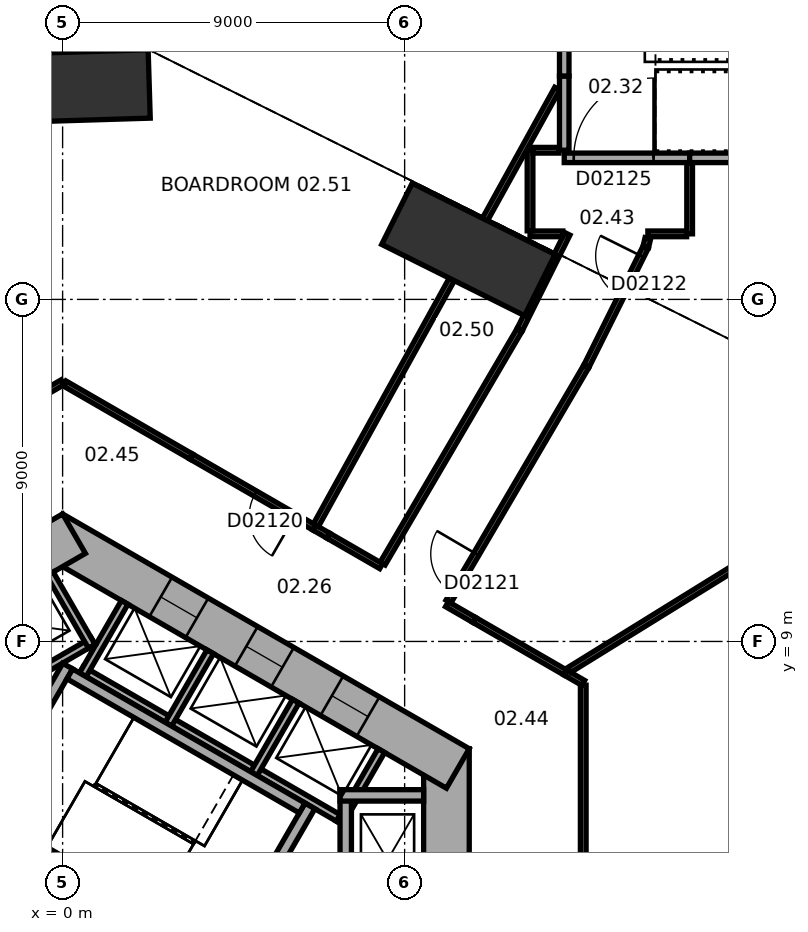
"""IFC4 building model, lengths in metres.
Left out: names, types, materials, properties, quantities, classifications, styles, units other than length and angle.
Written with IfcOpenShell. Run it as: python <this file> out.ifc"""

import sys

from ifc_helpers import new_model, si_unit, direction, frame, frame_2d, origin, origin_2d, place, context, subcontext, project, spatial, rectangle, extrude, element, fill, save


model = new_model("IFC4")
c1 = context("Model", 3, precision=1e-05, world=origin(), true_north=direction((0.0, 1.0)))
c2 = subcontext(c1, "Body", "Model", "MODEL_VIEW")
j1 = project(units=[si_unit("LENGTHUNIT", "METRE"), si_unit("PLANEANGLEUNIT", "RADIAN")], contexts=[c1])
p1 = place(None, origin())
s1 = spatial("IfcSite", under=j1, at=p1, CompositionType="ELEMENT")
p2 = place(p1, origin())
s2 = spatial("IfcBuilding", under=s1, at=p2, CompositionType="ELEMENT")
p3 = place(p2, frame((0.0, 0.0, 13.0)))
s3 = spatial("IfcBuildingStorey", under=s2, at=p3, CompositionType="ELEMENT", Elevation=13.0)
p4 = place(p3, frame((10.677, 19.315, 0.0), z_axis=(0.0, 0.0, 1.0), x_axis=(-0.894935140363, 0.446196251154, 0.0)))
e1 = element("IfcColumn", 1, at=p4, inside=s3, PredefinedType="COLUMN", context=c2, shape_type="SweptSolid", body=[
    extrude(rectangle(XDim=4.2, YDim=1.8, at=origin_2d()), origin(), (0.0, 0.0, 1.0), 8.0),
])
p5 = place(p3, frame((-0.72, 23.577, 0.0), z_axis=(0.0, 0.0, 1.0), x_axis=(-0.999533644135, -0.030536768695, 0.0)))
e2 = element("IfcColumn", 2, at=p5, inside=s3, PredefinedType="COLUMN", context=c2, shape_type="SweptSolid", body=[
    extrude(rectangle(XDim=6.0, YDim=1.8, at=origin_2d()), origin(), (0.0, 0.0, 1.0), 8.0),
])
p6 = place(p3, frame((10.1, -6.177, 0.0), z_axis=(0.0, 0.0, 1.0), x_axis=(0.0, 1.0, 0.0)))
e3 = element("IfcWall", 3, at=p6, inside=s3, PredefinedType="SHEAR", context=c2, shape_type="SweptSolid", body=[
    extrude(rectangle(XDim=12.355, YDim=1.2, at=frame_2d((6.177, 0.0))), origin(), (0.0, 0.0, 1.0), 8.0),
])
p7 = place(p6, frame((6.378, 0.0, 0.0)))
e4 = element("IfcOpeningElement", 4, at=p7, cuts=e3, PredefinedType="OPENING", context=c2, shape_type="SweptSolid", body=[
    extrude(rectangle(XDim=1.5, YDim=2.1, at=frame_2d((0.75, 1.05))), frame((0.0, 0.61, 0.0), z_axis=(0.0, -1.0, 0.0), x_axis=(1.0, 0.0, 0.0)), (0.0, 0.0, 1.0), 1.22),
])
p8 = place(p6, frame((1.828, 0.0, 0.0)))
e5 = element("IfcOpeningElement", 5, at=p8, cuts=e3, PredefinedType="OPENING", context=c2, shape_type="SweptSolid", body=[
    extrude(rectangle(XDim=1.1, YDim=2.1, at=frame_2d((0.55, 1.05))), frame((0.0, 0.61, 0.0), z_axis=(0.0, -1.0, 0.0), x_axis=(1.0, 0.0, 0.0)), (0.0, 0.0, 1.0), 1.22),
])
p9 = place(p6, frame((4.427, 0.0, 0.0)))
e6 = element("IfcOpeningElement", 6, at=p9, cuts=e3, PredefinedType="OPENING", context=c2, shape_type="SweptSolid", body=[
    extrude(rectangle(XDim=1.1, YDim=2.1, at=frame_2d((0.55, 1.05))), frame((0.0, 0.61, 0.0), z_axis=(0.0, -1.0, 0.0), x_axis=(1.0, 0.0, 0.0)), (0.0, 0.0, 1.0), 1.22),
])
p10 = place(p3, frame((10.4, 5.658, 0.0), z_axis=(0.0, 0.0, 1.0), x_axis=(-0.866021384402, 0.500006961711, 0.0)))
e7 = element("IfcWall", 7, at=p10, inside=s3, PredefinedType="SHEAR", context=c2, shape_type="SweptSolid", body=[
    extrude(rectangle(XDim=12.355, YDim=1.2, at=frame_2d((6.178, 0.0))), origin(), (0.0, 0.0, 1.0), 8.0),
])
p11 = place(p10, frame((2.728, 0.0, 0.0)))
e8 = element("IfcOpeningElement", 8, at=p11, cuts=e7, PredefinedType="OPENING", context=c2, shape_type="SweptSolid", body=[
    extrude(rectangle(XDim=1.1, YDim=2.1, at=frame_2d((0.55, 1.05))), frame((0.0, 0.61, 0.0), z_axis=(0.0, -1.0, 0.0), x_axis=(1.0, 0.0, 0.0)), (0.0, 0.0, 1.0), 1.22),
])
p12 = place(p10, frame((5.328, 0.0, 0.0)))
e9 = element("IfcOpeningElement", 9, at=p12, cuts=e7, PredefinedType="OPENING", context=c2, shape_type="SweptSolid", body=[
    extrude(rectangle(XDim=1.1, YDim=2.1, at=frame_2d((0.55, 1.05))), frame((0.0, 0.61, 0.0), z_axis=(0.0, -1.0, 0.0), x_axis=(1.0, 0.0, 0.0)), (0.0, 0.0, 1.0), 1.22),
])
p13 = place(p10, frame((7.928, 0.0, 0.0)))
e10 = element("IfcOpeningElement", 10, at=p13, cuts=e7, PredefinedType="OPENING", context=c2, shape_type="SweptSolid", body=[
    extrude(rectangle(XDim=1.1, YDim=2.1, at=frame_2d((0.55, 1.05))), frame((0.0, 0.61, 0.0), z_axis=(0.0, -1.0, 0.0), x_axis=(1.0, 0.0, 0.0)), (0.0, 0.0, 1.0), 1.22),
])
p14 = place(p3, frame((0.3, 11.836, 0.0), z_axis=(0.0, 0.0, 1.0), x_axis=(-0.866021384402, -0.500006961711, 0.0)))
e11 = element("IfcWall", 11, at=p14, inside=s3, PredefinedType="SHEAR", context=c2, shape_type="SweptSolid", body=[
    extrude(rectangle(XDim=12.355, YDim=1.2, at=frame_2d((6.178, 0.0))), origin(), (0.0, 0.0, 1.0), 8.0),
])
p15 = place(p14, frame((6.378, 0.0, 0.0)))
e12 = element("IfcOpeningElement", 12, at=p15, cuts=e11, PredefinedType="OPENING", context=c2, shape_type="SweptSolid", body=[
    extrude(rectangle(XDim=1.5, YDim=2.1, at=frame_2d((0.75, 1.05))), frame((0.0, 0.61, 0.0), z_axis=(0.0, -1.0, 0.0), x_axis=(1.0, 0.0, 0.0)), (0.0, 0.0, 1.0), 1.22),
])
p16 = place(p14, frame((1.828, 0.0, 0.0)))
e13 = element("IfcOpeningElement", 13, at=p16, cuts=e11, PredefinedType="OPENING", context=c2, shape_type="SweptSolid", body=[
    extrude(rectangle(XDim=1.1, YDim=2.1, at=frame_2d((0.55, 1.05))), frame((0.0, 0.61, 0.0), z_axis=(0.0, -1.0, 0.0), x_axis=(1.0, 0.0, 0.0)), (0.0, 0.0, 1.0), 1.22),
])
p17 = place(p3, frame((7.424, 4.259, 0.0), z_axis=(0.0, 0.0, 1.0), x_axis=(-0.866026010844, 0.49999894854, 0.0)))
e14 = element("IfcWall", 14, at=p17, inside=s3, PredefinedType="PARTITIONING", context=c2, shape_type="SweptSolid", body=[
    extrude(rectangle(XDim=8.0, YDim=0.2, at=frame_2d((4.0, 0.0))), origin(), (0.0, 0.0, 1.0), 7.7),
])
for number, where, z_axis, x_axis in (
    (15, (7.287, 4.222, 0.0), (0.0, 0.0, 1.0), (0.5, 0.866, 0.0)),
    (16, (5.036, 5.522, 0.0), (0.0, 0.0, 1.0), (0.5, 0.866, 0.0)),
    (17, (2.784, 6.822, 0.0), (0.0, 0.0, 1.0), (0.5, 0.866, 0.0)),
    (18, (0.532, 8.122, 0.0), (0.0, 0.0, 1.0), (0.5, 0.866, 0.0)),
):
    element("IfcWall", number, at=place(p3, frame(where, z_axis=z_axis, x_axis=x_axis)), inside=s3, PredefinedType="PARTITIONING", context=c2, shape_type="SweptSolid", body=[
        extrude(rectangle(XDim=2.2, YDim=0.2, at=frame_2d((1.1, 0.0))), origin(), (0.0, 0.0, 1.0), 7.7),
    ])
p18 = place(p3, frame((0.803, 9.009, 0.0), z_axis=(0.0, 0.0, 1.0), x_axis=(-0.866028230842, -0.499995103361, 0.0)))
e19 = element("IfcWall", 19, at=p18, inside=s3, PredefinedType="PARTITIONING", context=c2, shape_type="SweptSolid", body=[
    extrude(rectangle(XDim=5.4, YDim=0.2, at=frame_2d((2.7, 0.0))), origin(), (0.0, 0.0, 1.0), 7.7),
])
p19 = place(p3, frame((0.767, 8.872, 0.0), z_axis=(0.0, 0.0, 1.0), x_axis=(-0.499994660107, 0.866028486751, 0.0)))
e20 = element("IfcWall", 20, at=p19, inside=s3, PredefinedType="PARTITIONING", context=c2, shape_type="SweptSolid", body=[
    extrude(rectangle(XDim=2.2, YDim=0.2, at=frame_2d((1.1, 0.0))), origin(), (0.0, 0.0, 1.0), 7.7),
])
p20 = place(p3, frame((4.158, 0.602, 0.0), z_axis=(0.0, 0.0, 1.0), x_axis=(0.499977259774, 0.866038532462, 0.0)))
e21 = element("IfcWall", 21, at=p20, inside=s3, PredefinedType="SHEAR", context=c2, shape_type="SweptSolid", body=[
    extrude(rectangle(XDim=4.7, YDim=0.3, at=frame_2d((2.35, 0.0))), origin(), (0.0, 0.0, 1.0), 7.7),
])
p21 = place(p20, frame((0.8, 0.0, 0.0)))
e22 = element("IfcOpeningElement", 22, at=p21, cuts=e21, PredefinedType="OPENING", context=c2, shape_type="SweptSolid", body=[
    extrude(rectangle(XDim=1.2, YDim=2.1, at=frame_2d((0.6, 1.05))), frame((0.0, 0.16, 0.0), z_axis=(0.0, -1.0, 0.0), x_axis=(1.0, 0.0, 0.0)), (0.0, 0.0, 1.0), 0.32),
])
p22 = place(p3, frame((-2.216, 4.282, 0.0), z_axis=(0.0, 0.0, 1.0), x_axis=(0.499977259774, 0.866038532462, 0.0)))
e23 = element("IfcWall", 23, at=p22, inside=s3, PredefinedType="SHEAR", context=c2, shape_type="SweptSolid", body=[
    extrude(rectangle(XDim=4.7, YDim=0.3, at=frame_2d((2.35, 0.0))), origin(), (0.0, 0.0, 1.0), 7.7),
])
for number, where, z_axis, x_axis in (
    (24, (4.103, 0.807, 0.0), (0.0, 0.0, 1.0), (-0.866, 0.5, 0.0)),
    (25, (6.303, 4.617, 0.0), (0.0, 0.0, 1.0), (-0.866, 0.5, 0.0)),
):
    element("IfcWall", number, at=place(p3, frame(where, z_axis=z_axis, x_axis=x_axis)), inside=s3, PredefinedType="SHEAR", context=c2, shape_type="SweptSolid", body=[
        extrude(rectangle(XDim=7.06, YDim=0.3, at=frame_2d((3.53, 0.0))), origin(), (0.0, 0.0, 1.0), 7.7),
    ])
p23 = place(p3, frame((7.45, 1.75, 0.0), z_axis=(0.0, 0.0, 1.0), x_axis=(0.0, 1.0, 0.0)))
e26 = element("IfcWall", 26, at=p23, inside=s3, PredefinedType="SHEAR", context=c2, shape_type="SweptSolid", body=[
    extrude(rectangle(XDim=3.35, YDim=0.3, at=frame_2d((1.675, 0.0))), origin(), (0.0, 0.0, 1.0), 7.7),
])
p24 = place(p3, frame((7.3, 4.95, 0.0), z_axis=(0.0, 0.0, 1.0), x_axis=(1.0, 0.0, 0.0)))
e27 = element("IfcWall", 27, at=p24, inside=s3, PredefinedType="SHEAR", context=c2, shape_type="SweptSolid", body=[
    extrude(rectangle(XDim=2.2, YDim=0.3, at=frame_2d((1.1, 0.0))), origin(), (0.0, 0.0, 1.0), 7.7),
])
p25 = place(p3, frame((13.7, 7.85, 0.0), z_axis=(0.0, 0.0, 1.0), x_axis=(0.0, -1.0, 0.0)))
e28 = element("IfcWall", 28, at=p25, inside=s3, PredefinedType="PARTITIONING", context=c2, shape_type="SweptSolid", body=[
    extrude(rectangle(XDim=7.187, YDim=0.15, at=frame_2d((3.594, 0.0))), origin(), (0.0, 0.0, 1.0), 7.7),
])
p26 = place(p3, frame((13.7, 7.909, 0.0), z_axis=(0.0, 0.0, 1.0), x_axis=(-0.865629350875, 0.50068535719, 0.0)))
e29 = element("IfcWall", 29, at=p26, inside=s3, PredefinedType="PARTITIONING", context=c2, shape_type="SweptSolid", body=[
    extrude(rectangle(XDim=0.549, YDim=0.15, at=frame_2d((0.274, 0.0))), origin(), (0.0, 0.0, 1.0), 7.7),
])
p27 = place(p3, frame((10.833, 9.564, 0.0), z_axis=(0.0, 0.0, 1.0), x_axis=(0.866091368387, -0.499885728548, 0.0)))
e30 = element("IfcWall", 30, at=p27, inside=s3, PredefinedType="PARTITIONING", context=c2, shape_type="SweptSolid", body=[
    extrude(rectangle(XDim=2.761, YDim=0.15, at=frame_2d((1.381, 0.0))), origin(), (0.0, 0.0, 1.0), 7.7),
])
p28 = place(p3, frame((10.114, 9.98, 0.0), z_axis=(0.0, 0.0, 1.0), x_axis=(0.865848115047, -0.500306947453, 0.0)))
e31 = element("IfcWall", 31, at=p28, inside=s3, PredefinedType="PARTITIONING", context=c2, shape_type="SweptSolid", body=[
    extrude(rectangle(XDim=0.832, YDim=0.15, at=frame_2d((0.416, 0.0))), origin(), (0.0, 0.0, 1.0), 7.7),
])
p29 = place(p3, frame((8.422, 11.05, 0.0), z_axis=(0.0, 0.0, 1.0), x_axis=(0.50561651199, 0.862758333952, 0.0)))
e32 = element("IfcWall", 32, at=p29, inside=s3, PredefinedType="PARTITIONING", context=c2, shape_type="SweptSolid", body=[
    extrude(rectangle(XDim=7.118, YDim=0.15, at=frame_2d((3.559, 0.0))), origin(), (0.0, 0.0, 1.0), 6.9),
])
p30 = place(p3, frame((6.995, 11.781, 0.0), z_axis=(0.0, 0.0, 1.0), x_axis=(0.866076391369, -0.499911676512, 0.0)))
e33 = element("IfcWall", 33, at=p30, inside=s3, PredefinedType="PARTITIONING", context=c2, shape_type="SweptSolid", body=[
    extrude(rectangle(XDim=1.601, YDim=0.15, at=frame_2d((0.8, 0.0))), origin(), (0.0, 0.0, 1.0), 7.7),
])
p31 = place(p3, frame((6.995, 11.781, 0.0), z_axis=(0.0, 0.0, 1.0), x_axis=(-0.866281716711, 0.49955578997, 0.0)))
e34 = element("IfcWall", 34, at=p31, inside=s3, PredefinedType="PARTITIONING", context=c2, shape_type="SweptSolid", body=[
    extrude(rectangle(XDim=0.423, YDim=0.15, at=frame_2d((0.211, 0.0))), origin(), (0.0, 0.0, 1.0), 7.7),
])
p32 = place(p3, frame((6.629, 11.992, 0.0), z_axis=(0.0, 0.0, 1.0), x_axis=(-0.86599558016, 0.500051652475, 0.0)))
e35 = element("IfcWall", 35, at=p32, inside=s3, PredefinedType="PARTITIONING", context=c2, shape_type="SweptSolid", body=[
    extrude(rectangle(XDim=3.745, YDim=0.15, at=frame_2d((1.872, 0.0))), origin(), (0.0, 0.0, 1.0), 7.7),
])
p33 = place(p32, frame((0.6, 0.0, 0.0)))
e36 = element("IfcOpeningElement", 36, at=p33, cuts=e35, PredefinedType="OPENING", context=c2, shape_type="SweptSolid", body=[
    extrude(rectangle(XDim=1.2, YDim=2.1, at=frame_2d((0.6, 1.05))), frame((0.0, 0.085, 0.0), z_axis=(0.0, -1.0, 0.0), x_axis=(1.0, 0.0, 0.0)), (0.0, 0.0, 1.0), 0.17),
])
p34 = place(p3, frame((6.668, 12.062, 0.0), z_axis=(0.0, 0.0, 1.0), x_axis=(0.483795376692, 0.875181143245, 0.0)))
e37 = element("IfcWall", 37, at=p34, inside=s3, PredefinedType="PARTITIONING", context=c2, shape_type="SweptSolid", body=[
    extrude(rectangle(XDim=7.387, YDim=0.15, at=frame_2d((3.693, 0.0))), origin(), (0.0, 0.0, 1.0), 7.7),
])
p35 = place(p3, frame((19.949, 12.345, 0.0), z_axis=(0.0, 0.0, 1.0), x_axis=(-0.850341306025, -0.526231568102, 0.0)))
e38 = element("IfcWall", 38, at=p35, inside=s3, PredefinedType="MOVABLE", context=c2, shape_type="SweptSolid", body=[
    extrude(rectangle(XDim=7.787, YDim=0.15, at=frame_2d((3.894, 0.0))), origin(), (0.0, 0.0, 1.0), 7.7),
])
p36 = place(p3, frame((3.386, 13.865, 0.0), z_axis=(0.0, 0.0, 1.0), x_axis=(-0.866006051527, 0.500033517596, 0.0)))
e39 = element("IfcWall", 39, at=p36, inside=s3, PredefinedType="PARTITIONING", context=c2, shape_type="SweptSolid", body=[
    extrude(rectangle(XDim=3.85, YDim=0.15, at=frame_2d((1.925, 0.0))), origin(), (0.0, 0.0, 1.0), 7.7),
])
p37 = place(p3, frame((-0.475, 15.545, 0.0), z_axis=(0.0, 0.0, 1.0), x_axis=(0.865933599817, 0.500158975434, 0.0)))
e40 = element("IfcWall", 40, at=p37, inside=s3, PredefinedType="PARTITIONING", context=c2, shape_type="SweptSolid", body=[
    extrude(rectangle(XDim=0.549, YDim=0.15, at=frame_2d((0.274, 0.0))), origin(), (0.0, 0.0, 1.0), 7.7),
])
p38 = place(p3, frame((13.772, 16.224, 0.0), z_axis=(0.0, 0.0, 1.0), x_axis=(-0.505547889018, -0.862798546539, 0.0)))
e41 = element("IfcWall", 41, at=p38, inside=s3, PredefinedType="PARTITIONING", context=c2, shape_type="SweptSolid", body=[
    extrude(rectangle(XDim=7.156, YDim=0.15, at=frame_2d((3.578, 0.0))), origin(), (0.0, 0.0, 1.0), 7.7),
])
p39 = place(p38, frame((5.706, 0.0, 0.0)))
e42 = element("IfcOpeningElement", 42, at=p39, cuts=e41, PredefinedType="OPENING", context=c2, shape_type="SweptSolid", body=[
    extrude(rectangle(XDim=1.2, YDim=2.1, at=frame_2d((0.6, 1.05))), frame((0.0, 0.085, 0.0), z_axis=(0.0, -1.0, 0.0), x_axis=(1.0, 0.0, 0.0)), (0.0, 0.0, 1.0), 0.17),
])
p40 = place(p3, frame((12.03, 17.209, 0.0), z_axis=(0.0, 0.0, 1.0), x_axis=(0.445753790741, 0.89515560549, 0.0)))
e43 = element("IfcWall", 43, at=p40, inside=s3, PredefinedType="PARTITIONING", context=c2, shape_type="SweptSolid", body=[
    extrude(rectangle(XDim=2.811, YDim=0.15, at=frame_2d((1.405, 0.0))), origin(), (0.0, 0.0, 1.0), 7.7),
])
p41 = place(p3, frame((15.338, 19.365, 0.0), z_axis=(0.0, 0.0, 1.0), x_axis=(-0.44583629063, -0.895114518906, 0.0)))
e44 = element("IfcWall", 44, at=p41, inside=s3, PredefinedType="PARTITIONING", context=c2, shape_type="SweptSolid", body=[
    extrude(rectangle(XDim=3.476, YDim=0.15, at=frame_2d((1.738, 0.0))), origin(), (0.0, 0.0, 1.0), 7.7),
])
p42 = place(p41, frame((0.25, 0.0, 0.0)))
e45 = element("IfcOpeningElement", 45, at=p42, cuts=e44, PredefinedType="OPENING", context=c2, shape_type="SweptSolid", body=[
    extrude(rectangle(XDim=1.2, YDim=2.1, at=frame_2d((0.6, 1.05))), frame((0.0, 0.085, 0.0), z_axis=(0.0, -1.0, 0.0), x_axis=(1.0, 0.0, 0.0)), (0.0, 0.0, 1.0), 0.17),
])
p43 = place(p3, frame((15.4, 19.609, 0.0), z_axis=(0.0, 0.0, 1.0), x_axis=(-0.228393975948, -0.973568791484, 0.0)))
e46 = element("IfcWall", 46, at=p43, inside=s3, PredefinedType="PARTITIONING", context=c2, shape_type="SweptSolid", body=[
    extrude(rectangle(XDim=0.232, YDim=0.15, at=frame_2d((0.116, 0.0))), origin(), (0.0, 0.0, 1.0), 7.7),
])
p44 = place(p3, frame((13.163, 19.725, 0.0), z_axis=(0.0, 0.0, 1.0), x_axis=(-1.0, 0.0, 0.0)))
e47 = element("IfcWall", 47, at=p44, inside=s3, PredefinedType="PARTITIONING", context=c2, shape_type="SweptSolid", body=[
    extrude(rectangle(XDim=0.863, YDim=0.15, at=frame_2d((0.432, 0.0))), origin(), (0.0, 0.0, 1.0), 7.7),
])
p45 = place(p3, frame((16.42, 19.725, 0.0), z_axis=(0.0, 0.0, 1.0), x_axis=(-1.0, 0.0, 0.0)))
e48 = element("IfcWall", 48, at=p45, inside=s3, PredefinedType="PARTITIONING", context=c2, shape_type="SweptSolid", body=[
    extrude(rectangle(XDim=1.02, YDim=0.15, at=frame_2d((0.51, 0.0))), origin(), (0.0, 0.0, 1.0), 7.7),
])
p46 = place(p3, frame((12.3, 19.805, 0.0), z_axis=(0.0, 0.0, 1.0), x_axis=(0.0, 1.0, 0.0)))
e49 = element("IfcWall", 49, at=p46, inside=s3, PredefinedType="PARTITIONING", context=c2, shape_type="SweptSolid", body=[
    extrude(rectangle(XDim=2.12, YDim=0.15, at=frame_2d((1.06, 0.0))), origin(), (0.0, 0.0, 1.0), 7.7),
])
p47 = place(p3, frame((11.113, 20.104, 0.0), z_axis=(0.0, 0.0, 1.0), x_axis=(0.483823742959, 0.875165461927, 0.0)))
e50 = element("IfcWall", 50, at=p47, inside=s3, PredefinedType="PARTITIONING", context=c2, shape_type="SweptSolid", body=[
    extrude(rectangle(XDim=3.933, YDim=0.15, at=frame_2d((1.967, 0.0))), origin(), (0.0, 0.0, 1.0), 7.7),
])
p48 = place(p3, frame((16.5, 21.585, 0.0), z_axis=(0.0, 0.0, 1.0), x_axis=(0.0, -1.0, 0.0)))
e51 = element("IfcWall", 51, at=p48, inside=s3, PredefinedType="PARTITIONING", context=c2, shape_type="SweptSolid", body=[
    extrude(rectangle(XDim=1.86, YDim=0.15, at=frame_2d((0.93, 0.0))), origin(), (0.0, 0.0, 1.0), 7.7),
])
p49 = place(p3, frame((16.5, 21.725, 0.0), z_axis=(0.0, 0.0, 1.0), x_axis=(-1.0, 0.0, 0.0)))
e52 = element("IfcWall", 52, at=p49, inside=s3, PredefinedType="SOLIDWALL", context=c2, shape_type="SweptSolid", body=[
    extrude(rectangle(XDim=3.3, YDim=0.25, at=frame_2d((1.65, 0.0))), origin(), (0.0, 0.0, 1.0), 7.7),
])
p50 = place(p49, frame((0.95, 0.0, 0.0)))
e53 = element("IfcOpeningElement", 53, at=p50, cuts=e52, PredefinedType="OPENING", context=c2, shape_type="SweptSolid", body=[
    extrude(rectangle(XDim=2.1, YDim=2.4, at=frame_2d((1.05, 1.2))), frame((0.0, 0.135, 0.0), z_axis=(0.0, -1.0, 0.0), x_axis=(1.0, 0.0, 0.0)), (0.0, 0.0, 1.0), 0.27),
])
p51 = place(p3, frame((24.0, 21.725, 0.0), z_axis=(0.0, 0.0, 1.0), x_axis=(-1.0, 0.0, 0.0)))
e54 = element("IfcWall", 54, at=p51, inside=s3, PredefinedType="SOLIDWALL", context=c2, shape_type="SweptSolid", body=[
    extrude(rectangle(XDim=7.5, YDim=0.25, at=frame_2d((3.75, 0.0))), origin(), (0.0, 0.0, 1.0), 7.7),
])
p52 = place(p3, frame((12.38, 21.925, 0.0), z_axis=(0.0, 0.0, 1.0), x_axis=(1.0, 0.0, 0.0)))
e55 = element("IfcWall", 55, at=p52, inside=s3, PredefinedType="PARTITIONING", context=c2, shape_type="SweptSolid", body=[
    extrude(rectangle(XDim=0.68, YDim=0.15, at=frame_2d((0.34, 0.0))), origin(), (0.0, 0.0, 1.0), 7.7),
])
p53 = place(p3, frame((13.2, 21.925, 0.0), z_axis=(0.0, 0.0, 1.0), x_axis=(0.0, 1.0, 0.0)))
e56 = element("IfcWall", 56, at=p53, inside=s3, PredefinedType="SOLIDWALL", context=c2, shape_type="SweptSolid", body=[
    extrude(rectangle(XDim=1.953, YDim=0.25, at=frame_2d((0.977, 0.0))), origin(), (0.0, 0.0, 1.0), 7.7),
])
p54 = place(p3, frame((13.2, 23.878, 0.0), z_axis=(0.0, 0.0, 1.0), x_axis=(0.0, 1.0, 0.0)))
e57 = element("IfcWall", 57, at=p54, inside=s3, PredefinedType="SOLIDWALL", context=c2, shape_type="SweptSolid", body=[
    extrude(rectangle(XDim=2.562, YDim=0.25, at=frame_2d((1.281, 0.0))), origin(), (0.0, 0.0, 1.0), 7.7),
])
p55 = place(p11, origin())
e58 = element("IfcDoor", 58, at=p55, inside=s3, OperationType="DOUBLE_DOOR_SLIDING", PredefinedType="DOOR", context=c2, shape_type="SweptSolid", body=[
    extrude(rectangle(XDim=1.1, YDim=2.1, at=frame_2d((0.55, 1.05))), frame((0.0, 0.025, 0.0), z_axis=(0.0, -1.0, 0.0), x_axis=(1.0, 0.0, 0.0)), (0.0, 0.0, 1.0), 0.05),
])
fill(e8, e58)
p56 = place(p12, origin())
e59 = element("IfcDoor", 59, at=p56, inside=s3, OperationType="DOUBLE_DOOR_SLIDING", PredefinedType="DOOR", context=c2, shape_type="SweptSolid", body=[
    extrude(rectangle(XDim=1.1, YDim=2.1, at=frame_2d((0.55, 1.05))), frame((0.0, 0.025, 0.0), z_axis=(0.0, -1.0, 0.0), x_axis=(1.0, 0.0, 0.0)), (0.0, 0.0, 1.0), 0.05),
])
fill(e9, e59)
p57 = place(p13, origin())
e60 = element("IfcDoor", 60, at=p57, inside=s3, OperationType="DOUBLE_DOOR_SLIDING", PredefinedType="DOOR", context=c2, shape_type="SweptSolid", body=[
    extrude(rectangle(XDim=1.1, YDim=2.1, at=frame_2d((0.55, 1.05))), frame((0.0, 0.025, 0.0), z_axis=(0.0, -1.0, 0.0), x_axis=(1.0, 0.0, 0.0)), (0.0, 0.0, 1.0), 0.05),
])
fill(e10, e60)
p58 = place(p33, origin())
e61 = element("IfcDoor", 61, at=p58, inside=s3, OperationType="SINGLE_SWING_LEFT", PredefinedType="DOOR", context=c2, shape_type="SweptSolid", body=[
    extrude(rectangle(XDim=1.2, YDim=2.1, at=frame_2d((0.6, 1.05))), frame((0.0, 0.025, 0.0), z_axis=(0.0, -1.0, 0.0), x_axis=(1.0, 0.0, 0.0)), (0.0, 0.0, 1.0), 0.05),
])
fill(e36, e61)
p59 = place(p39, origin())
e62 = element("IfcDoor", 62, at=p59, inside=s3, OperationType="SINGLE_SWING_LEFT", PredefinedType="DOOR", context=c2, shape_type="SweptSolid", body=[
    extrude(rectangle(XDim=1.2, YDim=2.1, at=frame_2d((0.6, 1.05))), frame((0.0, 0.025, 0.0), z_axis=(0.0, -1.0, 0.0), x_axis=(1.0, 0.0, 0.0)), (0.0, 0.0, 1.0), 0.05),
])
fill(e42, e62)
p60 = place(p42, origin())
e63 = element("IfcDoor", 63, at=p60, inside=s3, OperationType="SINGLE_SWING_LEFT", PredefinedType="DOOR", context=c2, shape_type="SweptSolid", body=[
    extrude(rectangle(XDim=1.2, YDim=2.1, at=frame_2d((0.6, 1.05))), frame((0.0, 0.025, 0.0), z_axis=(0.0, -1.0, 0.0), x_axis=(1.0, 0.0, 0.0)), (0.0, 0.0, 1.0), 0.05),
])
fill(e45, e63)
p61 = place(p50, frame((2.1, 0.0, 0.0), z_axis=(0.0, 0.0, 1.0), x_axis=(-1.0, 0.0, 0.0)))
e64 = element("IfcDoor", 64, at=p61, inside=s3, OperationType="DOUBLE_DOOR_SINGLE_SWING", PredefinedType="DOOR", context=c2, shape_type="SweptSolid", body=[
    extrude(rectangle(XDim=2.1, YDim=2.4, at=frame_2d((1.05, 1.2))), frame((0.0, 0.025, 0.0), z_axis=(0.0, -1.0, 0.0), x_axis=(1.0, 0.0, 0.0)), (0.0, 0.0, 1.0), 0.05),
])
fill(e53, e64)
save(model, sys.argv[1])
